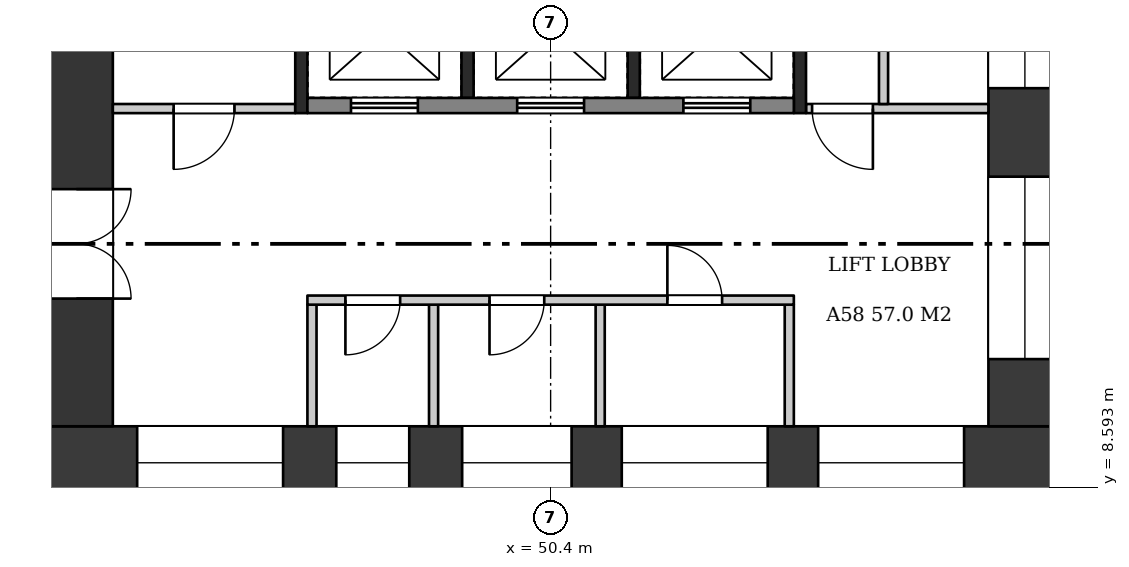
"""IFC4 building model, lengths in metres.
Left out: names, types, materials, properties, quantities, classifications, styles, units other than length and angle.
Written with IfcOpenShell. Run it as: python <this file> out.ifc"""

import sys

from ifc_helpers import new_model, si_unit, direction, frame, frame_2d, origin, place, context, subcontext, project, spatial, rectangle, extrude, element, fill, save


model = new_model("IFC4")
c1 = context("Model", 3, precision=1e-05, world=origin(), true_north=direction((0.0, 1.0)))
c2 = subcontext(c1, "Body", "Model", "MODEL_VIEW")
j1 = project(units=[si_unit("LENGTHUNIT", "METRE"), si_unit("PLANEANGLEUNIT", "RADIAN")], contexts=[c1])
p1 = place(None, origin())
s1 = spatial("IfcSite", under=j1, at=p1, CompositionType="ELEMENT")
p2 = place(p1, origin())
s2 = spatial("IfcBuilding", under=s1, at=p2, CompositionType="ELEMENT")
p3 = place(p2, frame((0.0, 0.0, 224.7)))
s3 = spatial("IfcBuildingStorey", under=s2, at=p3, CompositionType="ELEMENT", Elevation=224.7)
p4 = place(p3, frame((42.0, 9.0, 0.0), z_axis=(0.0, 0.0, 1.0), x_axis=(1.0, 0.0, 0.0)))
e1 = element("IfcWall", 1, at=p4, inside=s3, PredefinedType="SHEAR", context=c2, shape_type="SweptSolid", body=[
    extrude(rectangle(XDim=16.8, YDim=1.2, at=frame_2d((8.4, 0.0))), origin(), (0.0, 0.0, 1.0), 3.22),
])
p5 = place(p4, frame((1.6, 0.0, 0.6)))
e2 = element("IfcOpeningElement", 2, at=p5, cuts=e1, PredefinedType="OPENING", context=c2, shape_type="SweptSolid", body=[
    extrude(rectangle(XDim=2.4, YDim=2.1, at=frame_2d((1.2, 1.05))), frame((0.0, 0.61, 0.0), z_axis=(0.0, -1.0, 0.0), x_axis=(1.0, 0.0, 0.0)), (0.0, 0.0, 1.0), 1.22),
])
p6 = place(p4, frame((4.875, 0.0, 1.6)))
e3 = element("IfcOpeningElement", 3, at=p6, cuts=e1, PredefinedType="OPENING", context=c2, shape_type="SweptSolid", body=[
    extrude(rectangle(XDim=1.2, YDim=1.2, at=frame_2d((0.6, 0.6))), frame((0.0, 0.61, 0.0), z_axis=(0.0, -1.0, 0.0), x_axis=(1.0, 0.0, 0.0)), (0.0, 0.0, 1.0), 1.22),
])
p7 = place(p4, frame((6.945, 0.0, 1.6)))
e4 = element("IfcOpeningElement", 4, at=p7, cuts=e1, PredefinedType="OPENING", context=c2, shape_type="SweptSolid", body=[
    extrude(rectangle(XDim=1.8, YDim=1.2, at=frame_2d((0.9, 0.6))), frame((0.0, 0.61, 0.0), z_axis=(0.0, -1.0, 0.0), x_axis=(1.0, 0.0, 0.0)), (0.0, 0.0, 1.0), 1.22),
])
p8 = place(p4, frame((9.57, 0.0, 1.6)))
e5 = element("IfcOpeningElement", 5, at=p8, cuts=e1, PredefinedType="OPENING", context=c2, shape_type="SweptSolid", body=[
    extrude(rectangle(XDim=2.4, YDim=1.2, at=frame_2d((1.2, 0.6))), frame((0.0, 0.61, 0.0), z_axis=(0.0, -1.0, 0.0), x_axis=(1.0, 0.0, 0.0)), (0.0, 0.0, 1.0), 1.22),
])
p9 = place(p4, frame((12.8, 0.0, 0.6)))
e6 = element("IfcOpeningElement", 6, at=p9, cuts=e1, PredefinedType="OPENING", context=c2, shape_type="SweptSolid", body=[
    extrude(rectangle(XDim=2.4, YDim=2.1, at=frame_2d((1.2, 1.05))), frame((0.0, 0.61, 0.0), z_axis=(0.0, -1.0, 0.0), x_axis=(1.0, 0.0, 0.0)), (0.0, 0.0, 1.0), 1.22),
])
p10 = place(p3, frame((42.6, 9.6, 0.0), z_axis=(0.0, 0.0, 1.0), x_axis=(0.0, 1.0, 0.0)))
e7 = element("IfcWall", 7, at=p10, inside=s3, PredefinedType="SHEAR", context=c2, shape_type="SweptSolid", body=[
    extrude(rectangle(XDim=14.4, YDim=1.2, at=frame_2d((7.2, 0.0))), origin(), (0.0, 0.0, 1.0), 3.22),
])
p11 = place(p10, frame((2.1, 0.0, 0.0)))
e8 = element("IfcOpeningElement", 8, at=p11, cuts=e7, PredefinedType="OPENING", context=c2, shape_type="SweptSolid", body=[
    extrude(rectangle(XDim=1.8, YDim=2.1, at=frame_2d((0.9, 1.05))), frame((0.0, 0.61, 0.0), z_axis=(0.0, -1.0, 0.0), x_axis=(1.0, 0.0, 0.0)), (0.0, 0.0, 1.0), 1.22),
])
p12 = place(p3, frame((58.2, 9.6, 0.0), z_axis=(0.0, 0.0, 1.0), x_axis=(0.0, 1.0, 0.0)))
e9 = element("IfcWall", 9, at=p12, inside=s3, PredefinedType="SHEAR", context=c2, shape_type="SweptSolid", body=[
    extrude(rectangle(XDim=14.4, YDim=1.2, at=frame_2d((7.2, 0.0))), origin(), (0.0, 0.0, 1.0), 3.22),
])
p13 = place(p12, frame((1.105, 0.0, 0.6)))
e10 = element("IfcOpeningElement", 10, at=p13, cuts=e9, PredefinedType="OPENING", context=c2, shape_type="SweptSolid", body=[
    extrude(rectangle(XDim=3.0, YDim=2.1, at=frame_2d((1.5, 1.05))), frame((0.0, 0.61, 0.0), z_axis=(0.0, -1.0, 0.0), x_axis=(1.0, 0.0, 0.0)), (0.0, 0.0, 1.0), 1.22),
])
p14 = place(p12, frame((5.56, 0.0, 1.6)))
e11 = element("IfcOpeningElement", 11, at=p14, cuts=e9, PredefinedType="OPENING", context=c2, shape_type="SweptSolid", body=[
    extrude(rectangle(XDim=3.0, YDim=1.2, at=frame_2d((1.5, 0.6))), frame((0.0, 0.61, 0.0), z_axis=(0.0, -1.0, 0.0), x_axis=(1.0, 0.0, 0.0)), (0.0, 0.0, 1.0), 1.22),
])
p15 = place(p12, frame((9.39, 0.0, 1.6)))
e12 = element("IfcOpeningElement", 12, at=p15, cuts=e9, PredefinedType="OPENING", context=c2, shape_type="SweptSolid", body=[
    extrude(rectangle(XDim=1.8, YDim=1.2, at=frame_2d((0.9, 0.6))), frame((0.0, 0.61, 0.0), z_axis=(0.0, -1.0, 0.0), x_axis=(1.0, 0.0, 0.0)), (0.0, 0.0, 1.0), 1.22),
])
p16 = place(p12, frame((12.15, 0.0, 1.6)))
e13 = element("IfcOpeningElement", 13, at=p16, cuts=e9, PredefinedType="OPENING", context=c2, shape_type="SweptSolid", body=[
    extrude(rectangle(XDim=1.8, YDim=1.2, at=frame_2d((0.9, 0.6))), frame((0.0, 0.61, 0.0), z_axis=(0.0, -1.0, 0.0), x_axis=(1.0, 0.0, 0.0)), (0.0, 0.0, 1.0), 1.22),
])
for number, where, z_axis, x_axis in (
    (14, (46.475, 9.6, 0.0), (0.0, 0.0, 1.0), (0.0, 1.0, 0.0)),
    (15, (54.325, 9.6, 0.0), (0.0, 0.0, 1.0), (0.0, 1.0, 0.0)),
    (16, (48.475, 9.6, 0.0), (0.0, 0.0, 1.0), (0.0, 1.0, 0.0)),
    (17, (51.215, 9.6, 0.0), (0.0, 0.0, 1.0), (0.0, 1.0, 0.0)),
):
    element("IfcWall", number, at=place(p3, frame(where, z_axis=z_axis, x_axis=x_axis)), inside=s3, PredefinedType="PARTITIONING", context=c2, shape_type="SweptSolid", body=[
        extrude(rectangle(XDim=2.0, YDim=0.15, at=frame_2d((1.0, 0.0))), origin(), (0.0, 0.0, 1.0), 3.22),
    ])
p17 = place(p3, frame((46.4, 11.675, 0.0), z_axis=(0.0, 0.0, 1.0), x_axis=(1.0, 0.0, 0.0)))
e18 = element("IfcWall", 18, at=p17, inside=s3, PredefinedType="PARTITIONING", context=c2, shape_type="SweptSolid", body=[
    extrude(rectangle(XDim=8.0, YDim=0.15, at=frame_2d((4.0, 0.0))), origin(), (0.0, 0.0, 1.0), 3.22),
])
p18 = place(p17, frame((0.625, 0.0, 0.0)))
e19 = element("IfcOpeningElement", 19, at=p18, cuts=e18, PredefinedType="OPENING", context=c2, shape_type="SweptSolid", body=[
    extrude(rectangle(XDim=0.9, YDim=2.1, at=frame_2d((0.45, 1.05))), frame((0.0, 0.085, 0.0), z_axis=(0.0, -1.0, 0.0), x_axis=(1.0, 0.0, 0.0)), (0.0, 0.0, 1.0), 0.17),
])
p19 = place(p17, frame((2.995, 0.0, 0.0)))
e20 = element("IfcOpeningElement", 20, at=p19, cuts=e18, PredefinedType="OPENING", context=c2, shape_type="SweptSolid", body=[
    extrude(rectangle(XDim=0.9, YDim=2.1, at=frame_2d((0.45, 1.05))), frame((0.0, 0.085, 0.0), z_axis=(0.0, -1.0, 0.0), x_axis=(1.0, 0.0, 0.0)), (0.0, 0.0, 1.0), 0.17),
])
p20 = place(p17, frame((5.92, 0.0, 0.0)))
e21 = element("IfcOpeningElement", 21, at=p20, cuts=e18, PredefinedType="OPENING", context=c2, shape_type="SweptSolid", body=[
    extrude(rectangle(XDim=0.9, YDim=2.1, at=frame_2d((0.45, 1.05))), frame((0.0, 0.085, 0.0), z_axis=(0.0, -1.0, 0.0), x_axis=(1.0, 0.0, 0.0)), (0.0, 0.0, 1.0), 0.17),
])
for number, where, z_axis, x_axis in (
    (22, (49.033, 15.0, 0.0), (0.0, 0.0, 1.0), (0.0, 1.0, 0.0)),
    (23, (51.767, 15.0, 0.0), (0.0, 0.0, 1.0), (0.0, 1.0, 0.0)),
):
    element("IfcWall", number, at=place(p3, frame(where, z_axis=z_axis, x_axis=x_axis)), inside=s3, PredefinedType="SHEAR", context=c2, shape_type="SweptSolid", body=[
        extrude(rectangle(XDim=1.9, YDim=0.2, at=frame_2d((0.95, 0.0))), origin(), (0.0, 0.0, 1.0), 3.22),
    ])
p21 = place(p3, frame((46.4, 14.875, 0.0), z_axis=(0.0, 0.0, 1.0), x_axis=(1.0, 0.0, 0.0)))
e24 = element("IfcWall", 24, at=p21, inside=s3, PredefinedType="SHEAR", context=c2, shape_type="SweptSolid", body=[
    extrude(rectangle(XDim=8.0, YDim=0.25, at=frame_2d((4.0, 0.0))), origin(), (0.0, 0.0, 1.0), 3.22),
])
p22 = place(p21, frame((0.717, 0.0, 0.0)))
e25 = element("IfcOpeningElement", 25, at=p22, cuts=e24, PredefinedType="OPENING", context=c2, shape_type="SweptSolid", body=[
    extrude(rectangle(XDim=1.1, YDim=2.1, at=frame_2d((0.55, 1.05))), frame((0.0, 0.135, 0.0), z_axis=(0.0, -1.0, 0.0), x_axis=(1.0, 0.0, 0.0)), (0.0, 0.0, 1.0), 0.27),
])
p23 = place(p21, frame((3.45, 0.0, 0.0)))
e26 = element("IfcOpeningElement", 26, at=p23, cuts=e24, PredefinedType="OPENING", context=c2, shape_type="SweptSolid", body=[
    extrude(rectangle(XDim=1.1, YDim=2.1, at=frame_2d((0.55, 1.05))), frame((0.0, 0.135, 0.0), z_axis=(0.0, -1.0, 0.0), x_axis=(1.0, 0.0, 0.0)), (0.0, 0.0, 1.0), 0.27),
])
p24 = place(p21, frame((6.183, 0.0, 0.0)))
e27 = element("IfcOpeningElement", 27, at=p24, cuts=e24, PredefinedType="OPENING", context=c2, shape_type="SweptSolid", body=[
    extrude(rectangle(XDim=1.1, YDim=2.1, at=frame_2d((0.55, 1.05))), frame((0.0, 0.135, 0.0), z_axis=(0.0, -1.0, 0.0), x_axis=(1.0, 0.0, 0.0)), (0.0, 0.0, 1.0), 0.27),
])
p25 = place(p3, frame((46.3, 14.75, 0.0), z_axis=(0.0, 0.0, 1.0), x_axis=(0.0, 1.0, 0.0)))
e28 = element("IfcWall", 28, at=p25, inside=s3, PredefinedType="SHEAR", context=c2, shape_type="SweptSolid", body=[
    extrude(rectangle(XDim=2.4, YDim=0.2, at=frame_2d((1.2, 0.0))), origin(), (0.0, 0.0, 1.0), 3.22),
])
p26 = place(p3, frame((43.2, 14.825, 0.0), z_axis=(0.0, 0.0, 1.0), x_axis=(1.0, 0.0, 0.0)))
e29 = element("IfcWall", 29, at=p26, inside=s3, PredefinedType="PARTITIONING", context=c2, shape_type="SweptSolid", body=[
    extrude(rectangle(XDim=3.0, YDim=0.15, at=frame_2d((1.5, 0.0))), origin(), (0.0, 0.0, 1.0), 3.22),
])
p27 = place(p26, frame((1.0, 0.0, 0.0)))
e30 = element("IfcOpeningElement", 30, at=p27, cuts=e29, PredefinedType="OPENING", context=c2, shape_type="SweptSolid", body=[
    extrude(rectangle(XDim=1.0, YDim=2.1, at=frame_2d((0.5, 1.05))), frame((0.0, 0.085, 0.0), z_axis=(0.0, -1.0, 0.0), x_axis=(1.0, 0.0, 0.0)), (0.0, 0.0, 1.0), 0.17),
])
p28 = place(p3, frame((54.5, 14.75, 0.0), z_axis=(0.0, 0.0, 1.0), x_axis=(0.0, 1.0, 0.0)))
e31 = element("IfcWall", 31, at=p28, inside=s3, PredefinedType="SHEAR", context=c2, shape_type="SweptSolid", body=[
    extrude(rectangle(XDim=9.25, YDim=0.2, at=frame_2d((4.625, 0.0))), origin(), (0.0, 0.0, 1.0), 3.22),
])
p29 = place(p3, frame((54.6, 14.825, 0.0), z_axis=(0.0, 0.0, 1.0), x_axis=(1.0, 0.0, 0.0)))
e32 = element("IfcWall", 32, at=p29, inside=s3, PredefinedType="PARTITIONING", context=c2, shape_type="SweptSolid", body=[
    extrude(rectangle(XDim=3.0, YDim=0.15, at=frame_2d((1.5, 0.0))), origin(), (0.0, 0.0, 1.0), 3.22),
])
p30 = place(p29, frame((0.1, 0.0, 0.0)))
e33 = element("IfcOpeningElement", 33, at=p30, cuts=e32, PredefinedType="OPENING", context=c2, shape_type="SweptSolid", body=[
    extrude(rectangle(XDim=1.0, YDim=2.1, at=frame_2d((0.5, 1.05))), frame((0.0, 0.085, 0.0), z_axis=(0.0, -1.0, 0.0), x_axis=(1.0, 0.0, 0.0)), (0.0, 0.0, 1.0), 0.17),
])
p31 = place(p3, frame((55.875, 14.9, 0.0), z_axis=(0.0, 0.0, 1.0), x_axis=(0.0, 1.0, 0.0)))
e34 = element("IfcWall", 34, at=p31, inside=s3, PredefinedType="PARTITIONING", context=c2, shape_type="SweptSolid", body=[
    extrude(rectangle(XDim=9.1, YDim=0.15, at=frame_2d((4.55, 0.0))), origin(), (0.0, 0.0, 1.0), 3.22),
])
p32 = place(p31, frame((1.26, 0.0, 0.0)))
e35 = element("IfcOpeningElement", 35, at=p32, cuts=e34, PredefinedType="OPENING", context=c2, shape_type="SweptSolid", body=[
    extrude(rectangle(XDim=1.0, YDim=2.1, at=frame_2d((0.5, 1.05))), frame((0.0, 0.085, 0.0), z_axis=(0.0, -1.0, 0.0), x_axis=(1.0, 0.0, 0.0)), (0.0, 0.0, 1.0), 0.17),
])
p33 = place(p31, frame((4.54, 0.0, 0.0)))
e36 = element("IfcOpeningElement", 36, at=p33, cuts=e34, PredefinedType="OPENING", context=c2, shape_type="SweptSolid", body=[
    extrude(rectangle(XDim=0.9, YDim=2.1, at=frame_2d((0.45, 1.05))), frame((0.0, 0.085, 0.0), z_axis=(0.0, -1.0, 0.0), x_axis=(1.0, 0.0, 0.0)), (0.0, 0.0, 1.0), 0.17),
])
p34 = place(p31, frame((7.28, 0.0, 0.0)))
e37 = element("IfcOpeningElement", 37, at=p34, cuts=e34, PredefinedType="OPENING", context=c2, shape_type="SweptSolid", body=[
    extrude(rectangle(XDim=1.0, YDim=2.1, at=frame_2d((0.5, 1.05))), frame((0.0, 0.085, 0.0), z_axis=(0.0, -1.0, 0.0), x_axis=(1.0, 0.0, 0.0)), (0.0, 0.0, 1.0), 0.17),
])
p35 = place(p11, frame((1.8, 0.0, 0.0), z_axis=(0.0, 0.0, 1.0), x_axis=(-1.0, 0.0, 0.0)))
e38 = element("IfcDoor", 38, at=p35, inside=s3, OperationType="DOUBLE_DOOR_SINGLE_SWING", PredefinedType="DOOR", context=c2, shape_type="SweptSolid", body=[
    extrude(rectangle(XDim=1.8, YDim=2.1, at=frame_2d((0.9, 1.05))), frame((0.0, 0.025, 0.0), z_axis=(0.0, -1.0, 0.0), x_axis=(1.0, 0.0, 0.0)), (0.0, 0.0, 1.0), 0.05),
])
fill(e8, e38)
p36 = place(p18, frame((0.9, 0.0, 0.0), z_axis=(0.0, 0.0, 1.0), x_axis=(-1.0, 0.0, 0.0)))
e39 = element("IfcDoor", 39, at=p36, inside=s3, OperationType="SINGLE_SWING_RIGHT", PredefinedType="DOOR", context=c2, shape_type="SweptSolid", body=[
    extrude(rectangle(XDim=0.9, YDim=2.1, at=frame_2d((0.45, 1.05))), frame((0.0, 0.025, 0.0), z_axis=(0.0, -1.0, 0.0), x_axis=(1.0, 0.0, 0.0)), (0.0, 0.0, 1.0), 0.05),
])
fill(e19, e39)
p37 = place(p19, frame((0.9, 0.0, 0.0), z_axis=(0.0, 0.0, 1.0), x_axis=(-1.0, 0.0, 0.0)))
e40 = element("IfcDoor", 40, at=p37, inside=s3, OperationType="SINGLE_SWING_RIGHT", PredefinedType="DOOR", context=c2, shape_type="SweptSolid", body=[
    extrude(rectangle(XDim=0.9, YDim=2.1, at=frame_2d((0.45, 1.05))), frame((0.0, 0.025, 0.0), z_axis=(0.0, -1.0, 0.0), x_axis=(1.0, 0.0, 0.0)), (0.0, 0.0, 1.0), 0.05),
])
fill(e20, e40)
p38 = place(p20, origin())
e41 = element("IfcDoor", 41, at=p38, inside=s3, OperationType="SINGLE_SWING_LEFT", PredefinedType="DOOR", context=c2, shape_type="SweptSolid", body=[
    extrude(rectangle(XDim=0.9, YDim=2.1, at=frame_2d((0.45, 1.05))), frame((0.0, 0.025, 0.0), z_axis=(0.0, -1.0, 0.0), x_axis=(1.0, 0.0, 0.0)), (0.0, 0.0, 1.0), 0.05),
])
fill(e21, e41)
p39 = place(p22, origin())
e42 = element("IfcDoor", 42, at=p39, inside=s3, OperationType="DOUBLE_DOOR_SLIDING", PredefinedType="DOOR", context=c2, shape_type="SweptSolid", body=[
    extrude(rectangle(XDim=1.1, YDim=2.1, at=frame_2d((0.55, 1.05))), frame((0.0, 0.025, 0.0), z_axis=(0.0, -1.0, 0.0), x_axis=(1.0, 0.0, 0.0)), (0.0, 0.0, 1.0), 0.05),
])
fill(e25, e42)
p40 = place(p23, origin())
e43 = element("IfcDoor", 43, at=p40, inside=s3, OperationType="DOUBLE_DOOR_SLIDING", PredefinedType="DOOR", context=c2, shape_type="SweptSolid", body=[
    extrude(rectangle(XDim=1.1, YDim=2.1, at=frame_2d((0.55, 1.05))), frame((0.0, 0.025, 0.0), z_axis=(0.0, -1.0, 0.0), x_axis=(1.0, 0.0, 0.0)), (0.0, 0.0, 1.0), 0.05),
])
fill(e26, e43)
p41 = place(p24, origin())
e44 = element("IfcDoor", 44, at=p41, inside=s3, OperationType="DOUBLE_DOOR_SLIDING", PredefinedType="DOOR", context=c2, shape_type="SweptSolid", body=[
    extrude(rectangle(XDim=1.1, YDim=2.1, at=frame_2d((0.55, 1.05))), frame((0.0, 0.025, 0.0), z_axis=(0.0, -1.0, 0.0), x_axis=(1.0, 0.0, 0.0)), (0.0, 0.0, 1.0), 0.05),
])
fill(e27, e44)
p42 = place(p27, frame((1.0, 0.0, 0.0), z_axis=(0.0, 0.0, 1.0), x_axis=(-1.0, 0.0, 0.0)))
e45 = element("IfcDoor", 45, at=p42, inside=s3, OperationType="SINGLE_SWING_RIGHT", PredefinedType="DOOR", context=c2, shape_type="SweptSolid", body=[
    extrude(rectangle(XDim=1.0, YDim=2.1, at=frame_2d((0.5, 1.05))), frame((0.0, 0.025, 0.0), z_axis=(0.0, -1.0, 0.0), x_axis=(1.0, 0.0, 0.0)), (0.0, 0.0, 1.0), 0.05),
])
fill(e30, e45)
p43 = place(p30, frame((1.0, 0.0, 0.0), z_axis=(0.0, 0.0, 1.0), x_axis=(-1.0, 0.0, 0.0)))
e46 = element("IfcDoor", 46, at=p43, inside=s3, OperationType="SINGLE_SWING_LEFT", PredefinedType="DOOR", context=c2, shape_type="SweptSolid", body=[
    extrude(rectangle(XDim=1.0, YDim=2.1, at=frame_2d((0.5, 1.05))), frame((0.0, 0.025, 0.0), z_axis=(0.0, -1.0, 0.0), x_axis=(1.0, 0.0, 0.0)), (0.0, 0.0, 1.0), 0.05),
])
fill(e33, e46)
p44 = place(p5, origin())
e47 = element("IfcWindow", 47, at=p44, inside=s3, PartitioningType="SINGLE_PANEL", PredefinedType="WINDOW", context=c2, shape_type="SweptSolid", body=[
    extrude(rectangle(XDim=2.4, YDim=2.1, at=frame_2d((1.2, 1.05))), frame((0.0, 0.03, 0.0), z_axis=(0.0, -1.0, 0.0), x_axis=(1.0, 0.0, 0.0)), (0.0, 0.0, 1.0), 0.06),
])
fill(e2, e47)
p45 = place(p6, origin())
e48 = element("IfcWindow", 48, at=p45, inside=s3, PartitioningType="SINGLE_PANEL", PredefinedType="WINDOW", context=c2, shape_type="SweptSolid", body=[
    extrude(rectangle(XDim=1.2, YDim=1.2, at=frame_2d((0.6, 0.6))), frame((0.0, 0.03, 0.0), z_axis=(0.0, -1.0, 0.0), x_axis=(1.0, 0.0, 0.0)), (0.0, 0.0, 1.0), 0.06),
])
fill(e3, e48)
p46 = place(p7, origin())
e49 = element("IfcWindow", 49, at=p46, inside=s3, PartitioningType="SINGLE_PANEL", PredefinedType="WINDOW", context=c2, shape_type="SweptSolid", body=[
    extrude(rectangle(XDim=1.8, YDim=1.2, at=frame_2d((0.9, 0.6))), frame((0.0, 0.03, 0.0), z_axis=(0.0, -1.0, 0.0), x_axis=(1.0, 0.0, 0.0)), (0.0, 0.0, 1.0), 0.06),
])
fill(e4, e49)
p47 = place(p8, origin())
e50 = element("IfcWindow", 50, at=p47, inside=s3, PartitioningType="SINGLE_PANEL", PredefinedType="WINDOW", context=c2, shape_type="SweptSolid", body=[
    extrude(rectangle(XDim=2.4, YDim=1.2, at=frame_2d((1.2, 0.6))), frame((0.0, 0.03, 0.0), z_axis=(0.0, -1.0, 0.0), x_axis=(1.0, 0.0, 0.0)), (0.0, 0.0, 1.0), 0.06),
])
fill(e5, e50)
p48 = place(p9, origin())
e51 = element("IfcWindow", 51, at=p48, inside=s3, PartitioningType="SINGLE_PANEL", PredefinedType="WINDOW", context=c2, shape_type="SweptSolid", body=[
    extrude(rectangle(XDim=2.4, YDim=2.1, at=frame_2d((1.2, 1.05))), frame((0.0, 0.03, 0.0), z_axis=(0.0, -1.0, 0.0), x_axis=(1.0, 0.0, 0.0)), (0.0, 0.0, 1.0), 0.06),
])
fill(e6, e51)
p49 = place(p13, origin())
e52 = element("IfcWindow", 52, at=p49, inside=s3, PartitioningType="SINGLE_PANEL", PredefinedType="WINDOW", context=c2, shape_type="SweptSolid", body=[
    extrude(rectangle(XDim=3.0, YDim=2.1, at=frame_2d((1.5, 1.05))), frame((0.0, 0.03, 0.0), z_axis=(0.0, -1.0, 0.0), x_axis=(1.0, 0.0, 0.0)), (0.0, 0.0, 1.0), 0.06),
])
fill(e10, e52)
p50 = place(p14, origin())
e53 = element("IfcWindow", 53, at=p50, inside=s3, PartitioningType="SINGLE_PANEL", PredefinedType="WINDOW", context=c2, shape_type="SweptSolid", body=[
    extrude(rectangle(XDim=3.0, YDim=1.2, at=frame_2d((1.5, 0.6))), frame((0.0, 0.03, 0.0), z_axis=(0.0, -1.0, 0.0), x_axis=(1.0, 0.0, 0.0)), (0.0, 0.0, 1.0), 0.06),
])
fill(e11, e53)
save(model, sys.argv[1])
